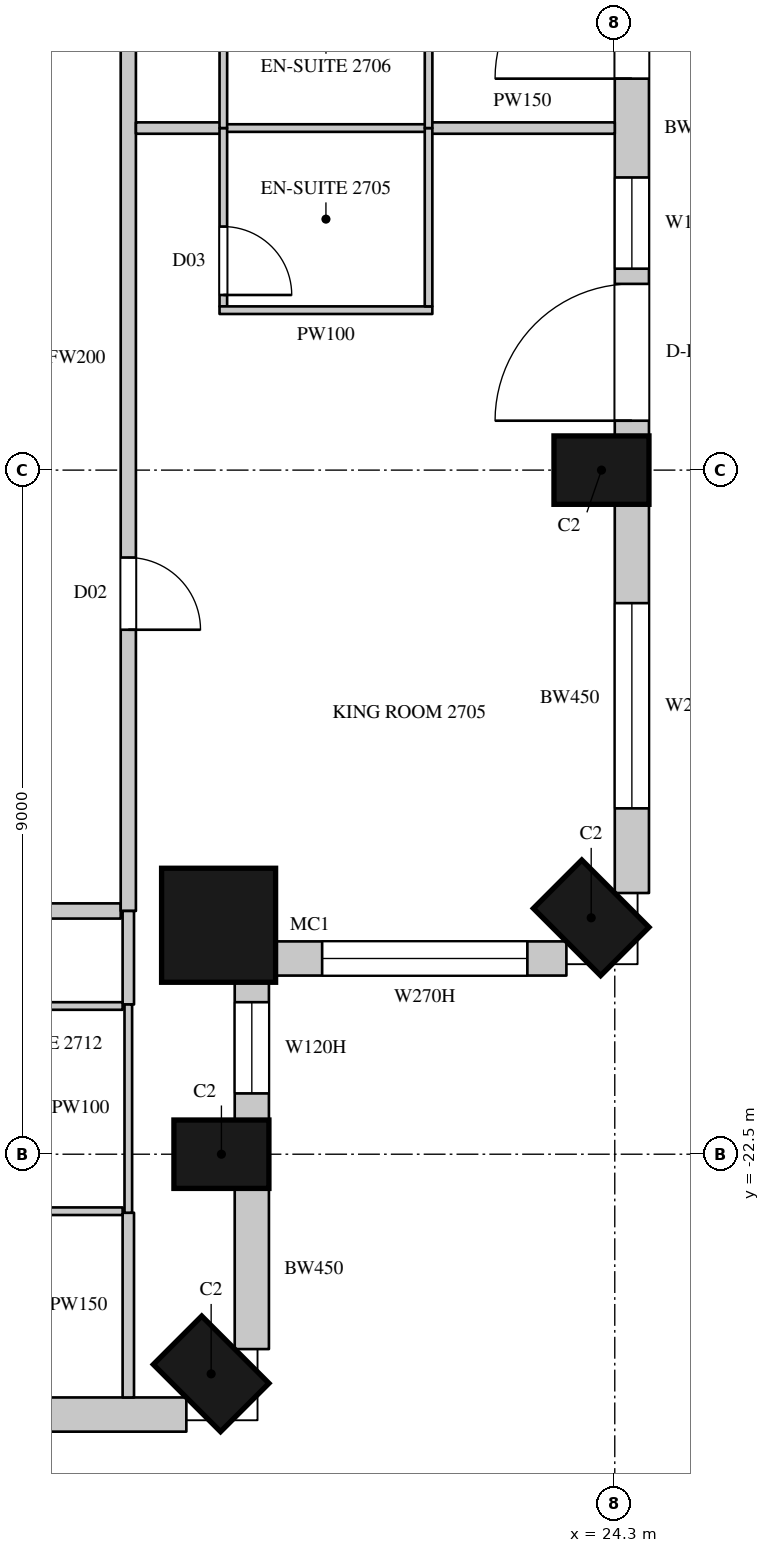
"""IFC4 building model, lengths in metres.
Left out: names, types, materials, properties, quantities, classifications, styles, units other than length and angle.
Written with IfcOpenShell. Run it as: python <this file> out.ifc"""

import sys

from ifc_helpers import new_model, si_unit, direction, frame, frame_2d, origin, origin_2d, place, context, subcontext, project, spatial, rectangle, circle, extrude, element, fill, save


model = new_model("IFC4")
c1 = context("Model", 3, precision=1e-05, world=origin(), true_north=direction((0.0, 1.0)))
c2 = subcontext(c1, "Body", "Model", "MODEL_VIEW")
j1 = project(units=[si_unit("LENGTHUNIT", "METRE"), si_unit("PLANEANGLEUNIT", "RADIAN")], contexts=[c1])
p1 = place(None, origin())
s1 = spatial("IfcSite", under=j1, at=p1, CompositionType="ELEMENT")
p2 = place(p1, origin())
s2 = spatial("IfcBuilding", under=s1, at=p2, CompositionType="ELEMENT")
p3 = place(p2, frame((0.0, 0.0, 127.5)))
s3 = spatial("IfcBuildingStorey", under=s2, at=p3, CompositionType="ELEMENT", Elevation=127.5)
for number, where, z_axis, x_axis in (
    (1, (18.99, -25.39, 0.0), (0.0, 0.0, 1.0), (0.707, 0.707, 0.0)),
    (2, (19.125, -22.5, 0.0), (0.0, 0.0, 1.0), (0.0, 1.0, 0.0)),
):
    element("IfcColumn", number, at=place(p3, frame(where, z_axis=z_axis, x_axis=x_axis)), inside=s3, PredefinedType="COLUMN", context=c2, shape_type="SweptSolid", body=[
        extrude(rectangle(XDim=0.9, YDim=1.25, at=origin_2d()), origin(), (0.0, 0.0, 1.0), 3.6),
    ])
p4 = place(p3, frame((19.088, -19.488, 0.0), z_axis=(0.0, 0.0, 1.0), x_axis=(1.0, 0.0, 0.0)))
e3 = element("IfcColumn", 3, at=p4, inside=s3, PredefinedType="COLUMN", context=c2, shape_type="SweptSolid", body=[
    extrude(circle(Radius=0.75, at=origin_2d()), origin(), (0.0, 0.0, 1.0), 3.6),
])
for number, where, z_axis, x_axis in (
    (4, (23.99, -19.39, 0.0), (0.0, 0.0, 1.0), (0.707, 0.707, 0.0)),
    (5, (24.125, -13.5, 0.0), (0.0, 0.0, 1.0), (0.0, 1.0, 0.0)),
):
    element("IfcColumn", number, at=place(p3, frame(where, z_axis=z_axis, x_axis=x_axis)), inside=s3, PredefinedType="COLUMN", context=c2, shape_type="SweptSolid", body=[
        extrude(rectangle(XDim=0.9, YDim=1.25, at=origin_2d()), origin(), (0.0, 0.0, 1.0), 3.6),
    ])
p5 = place(p3, frame((15.75, -25.925, 0.0), z_axis=(0.0, 0.0, 1.0), x_axis=(1.0, 0.0, 0.0)))
e6 = element("IfcWall", 6, at=p5, inside=s3, PredefinedType="SOLIDWALL", context=c2, shape_type="SweptSolid", body=[
    extrude(rectangle(XDim=2.914, YDim=0.45, at=frame_2d((1.457, 0.0))), origin(), (0.0, 0.0, 1.0), 3.3),
])
p6 = place(p3, frame((19.525, -25.064, 0.0), z_axis=(0.0, 0.0, 1.0), x_axis=(0.0, 1.0, 0.0)))
e7 = element("IfcWall", 7, at=p6, inside=s3, PredefinedType="SOLIDWALL", context=c2, shape_type="SweptSolid", body=[
    extrude(rectangle(XDim=2.114, YDim=0.45, at=frame_2d((1.057, 0.0))), origin(), (0.0, 0.0, 1.0), 3.3),
])
p7 = place(p3, frame((19.525, -22.05, 0.0), z_axis=(0.0, 0.0, 1.0), x_axis=(0.0, 1.0, 0.0)))
e8 = element("IfcWall", 8, at=p7, inside=s3, PredefinedType="SOLIDWALL", context=c2, shape_type="SweptSolid", body=[
    extrude(rectangle(XDim=1.843, YDim=0.45, at=frame_2d((0.921, 0.0))), origin(), (0.0, 0.0, 1.0), 3.3),
])
p8 = place(p7, frame((0.35, 0.0, 1.05)))
e9 = element("IfcOpeningElement", 9, at=p8, cuts=e8, PredefinedType="OPENING", context=c2, shape_type="SweptSolid", body=[
    extrude(rectangle(XDim=1.2, YDim=2.0, at=frame_2d((0.6, 1.0))), frame((0.0, 0.235, 0.0), z_axis=(0.0, -1.0, 0.0), x_axis=(1.0, 0.0, 0.0)), (0.0, 0.0, 1.0), 0.47),
])
p9 = place(p3, frame((19.807, -19.925, 0.0), z_axis=(0.0, 0.0, 1.0), x_axis=(1.0, 0.0, 0.0)))
e10 = element("IfcWall", 10, at=p9, inside=s3, PredefinedType="SOLIDWALL", context=c2, shape_type="SweptSolid", body=[
    extrude(rectangle(XDim=3.857, YDim=0.45, at=frame_2d((1.928, 0.0))), origin(), (0.0, 0.0, 1.0), 3.3),
])
p10 = place(p9, frame((0.643, 0.0, 1.05)))
e11 = element("IfcOpeningElement", 11, at=p10, cuts=e10, PredefinedType="OPENING", context=c2, shape_type="SweptSolid", body=[
    extrude(rectangle(XDim=2.7, YDim=2.0, at=frame_2d((1.35, 1.0))), frame((0.0, 0.235, 0.0), z_axis=(0.0, -1.0, 0.0), x_axis=(1.0, 0.0, 0.0)), (0.0, 0.0, 1.0), 0.47),
])
p11 = place(p3, frame((24.525, -19.064, 0.0), z_axis=(0.0, 0.0, 1.0), x_axis=(0.0, 1.0, 0.0)))
e12 = element("IfcWall", 12, at=p11, inside=s3, PredefinedType="SOLIDWALL", context=c2, shape_type="SweptSolid", body=[
    extrude(rectangle(XDim=5.114, YDim=0.45, at=frame_2d((2.557, 0.0))), origin(), (0.0, 0.0, 1.0), 3.3),
])
p12 = place(p11, frame((1.114, 0.0, 1.05)))
e13 = element("IfcOpeningElement", 13, at=p12, cuts=e12, PredefinedType="OPENING", context=c2, shape_type="SweptSolid", body=[
    extrude(rectangle(XDim=2.7, YDim=2.0, at=frame_2d((1.35, 1.0))), frame((0.0, 0.235, 0.0), z_axis=(0.0, -1.0, 0.0), x_axis=(1.0, 0.0, 0.0)), (0.0, 0.0, 1.0), 0.47),
])
p13 = place(p3, frame((24.525, -13.05, 0.0), z_axis=(0.0, 0.0, 1.0), x_axis=(0.0, 1.0, 0.0)))
e14 = element("IfcWall", 14, at=p13, inside=s3, PredefinedType="SOLIDWALL", context=c2, shape_type="SweptSolid", body=[
    extrude(rectangle(XDim=8.1, YDim=0.45, at=frame_2d((4.05, 0.0))), origin(), (0.0, 0.0, 1.0), 3.3),
])
p14 = place(p13, frame((0.2, 0.0, 0.0)))
e15 = element("IfcOpeningElement", 15, at=p14, cuts=e14, PredefinedType="OPENING", context=c2, shape_type="SweptSolid", body=[
    extrude(rectangle(XDim=1.8, YDim=2.4, at=frame_2d((0.9, 1.2))), frame((0.0, 0.235, 0.0), z_axis=(0.0, -1.0, 0.0), x_axis=(1.0, 0.0, 0.0)), (0.0, 0.0, 1.0), 0.47),
])
p15 = place(p13, frame((2.2, 0.0, 1.05)))
e16 = element("IfcOpeningElement", 16, at=p15, cuts=e14, PredefinedType="OPENING", context=c2, shape_type="SweptSolid", body=[
    extrude(rectangle(XDim=1.2, YDim=2.0, at=frame_2d((0.6, 1.0))), frame((0.0, 0.235, 0.0), z_axis=(0.0, -1.0, 0.0), x_axis=(1.0, 0.0, 0.0)), (0.0, 0.0, 1.0), 0.47),
])
p16 = place(p13, frame((4.7, 0.0, 0.0)))
e17 = element("IfcOpeningElement", 17, at=p16, cuts=e14, PredefinedType="OPENING", context=c2, shape_type="SweptSolid", body=[
    extrude(rectangle(XDim=1.8, YDim=2.4, at=frame_2d((0.9, 1.2))), frame((0.0, 0.235, 0.0), z_axis=(0.0, -1.0, 0.0), x_axis=(1.0, 0.0, 0.0)), (0.0, 0.0, 1.0), 0.47),
])
p17 = place(p13, frame((6.7, 0.0, 1.05)))
e18 = element("IfcOpeningElement", 18, at=p17, cuts=e14, PredefinedType="OPENING", context=c2, shape_type="SweptSolid", body=[
    extrude(rectangle(XDim=1.2, YDim=2.0, at=frame_2d((0.6, 1.0))), frame((0.0, 0.235, 0.0), z_axis=(0.0, -1.0, 0.0), x_axis=(1.0, 0.0, 0.0)), (0.0, 0.0, 1.0), 0.47),
])
p18 = place(p3, frame((-20.8, -19.3, 0.0), z_axis=(0.0, 0.0, 1.0), x_axis=(1.0, 0.0, 0.0)))
e19 = element("IfcWall", 19, at=p18, inside=s3, PredefinedType="PARTITIONING", context=c2, shape_type="SweptSolid", body=[
    extrude(rectangle(XDim=38.6, YDim=0.2, at=frame_2d((19.3, 0.0))), origin(), (0.0, 0.0, 1.0), 3.3),
])
p19 = place(p18, frame((11.2, 0.0, 0.0)))
e20 = element("IfcOpeningElement", 20, at=p19, cuts=e19, PredefinedType="OPENING", context=c2, shape_type="SweptSolid", body=[
    extrude(rectangle(XDim=0.95, YDim=2.2, at=frame_2d((0.475, 1.1))), frame((0.0, 0.11, 0.0), z_axis=(0.0, -1.0, 0.0), x_axis=(1.0, 0.0, 0.0)), (0.0, 0.0, 1.0), 0.22),
])
p20 = place(p18, frame((15.05, 0.0, 0.0)))
e21 = element("IfcOpeningElement", 21, at=p20, cuts=e19, PredefinedType="OPENING", context=c2, shape_type="SweptSolid", body=[
    extrude(rectangle(XDim=0.95, YDim=2.2, at=frame_2d((0.475, 1.1))), frame((0.0, 0.11, 0.0), z_axis=(0.0, -1.0, 0.0), x_axis=(1.0, 0.0, 0.0)), (0.0, 0.0, 1.0), 0.22),
])
p21 = place(p18, frame((29.2, 0.0, 0.0)))
e22 = element("IfcOpeningElement", 22, at=p21, cuts=e19, PredefinedType="OPENING", context=c2, shape_type="SweptSolid", body=[
    extrude(rectangle(XDim=0.95, YDim=2.2, at=frame_2d((0.475, 1.1))), frame((0.0, 0.11, 0.0), z_axis=(0.0, -1.0, 0.0), x_axis=(1.0, 0.0, 0.0)), (0.0, 0.0, 1.0), 0.22),
])
p22 = place(p18, frame((33.05, 0.0, 0.0)))
e23 = element("IfcOpeningElement", 23, at=p22, cuts=e19, PredefinedType="OPENING", context=c2, shape_type="SweptSolid", body=[
    extrude(rectangle(XDim=0.95, YDim=2.2, at=frame_2d((0.475, 1.1))), frame((0.0, 0.11, 0.0), z_axis=(0.0, -1.0, 0.0), x_axis=(1.0, 0.0, 0.0)), (0.0, 0.0, 1.0), 0.22),
])
p23 = place(p3, frame((17.9, -19.3, 0.0), z_axis=(0.0, 0.0, 1.0), x_axis=(0.0, 1.0, 0.0)))
e24 = element("IfcWall", 24, at=p23, inside=s3, PredefinedType="PARTITIONING", context=c2, shape_type="SweptSolid", body=[
    extrude(rectangle(XDim=14.55, YDim=0.2, at=frame_2d((7.275, 0.0))), origin(), (0.0, 0.0, 1.0), 3.3),
])
p24 = place(p23, frame((3.7, 0.0, 0.0)))
e25 = element("IfcOpeningElement", 25, at=p24, cuts=e24, PredefinedType="OPENING", context=c2, shape_type="SweptSolid", body=[
    extrude(rectangle(XDim=0.95, YDim=2.2, at=frame_2d((0.475, 1.1))), frame((0.0, 0.11, 0.0), z_axis=(0.0, -1.0, 0.0), x_axis=(1.0, 0.0, 0.0)), (0.0, 0.0, 1.0), 0.22),
])
p25 = place(p23, frame((13.2, 0.0, 0.0)))
e26 = element("IfcOpeningElement", 26, at=p25, cuts=e24, PredefinedType="OPENING", context=c2, shape_type="SweptSolid", body=[
    extrude(rectangle(XDim=0.95, YDim=2.2, at=frame_2d((0.475, 1.1))), frame((0.0, 0.11, 0.0), z_axis=(0.0, -1.0, 0.0), x_axis=(1.0, 0.0, 0.0)), (0.0, 0.0, 1.0), 0.22),
])
p26 = place(p3, frame((17.9, -25.7, 0.0), z_axis=(0.0, 0.0, 1.0), x_axis=(0.0, 1.0, 0.0)))
e27 = element("IfcWall", 27, at=p26, inside=s3, PredefinedType="PARTITIONING", context=c2, shape_type="SweptSolid", body=[
    extrude(rectangle(XDim=2.43, YDim=0.15, at=frame_2d((1.215, 0.0))), origin(), (0.0, 0.0, 1.0), 3.3),
])
p27 = place(p3, frame((17.9, -20.53, 0.0), z_axis=(0.0, 0.0, 1.0), x_axis=(0.0, 1.0, 0.0)))
e28 = element("IfcWall", 28, at=p27, inside=s3, PredefinedType="PARTITIONING", context=c2, shape_type="SweptSolid", body=[
    extrude(rectangle(XDim=1.23, YDim=0.15, at=frame_2d((0.615, 0.0))), origin(), (0.0, 0.0, 1.0), 3.3),
])
p28 = place(p3, frame((18.0, -9.0, 0.0), z_axis=(0.0, 0.0, 1.0), x_axis=(1.0, 0.0, 0.0)))
e29 = element("IfcWall", 29, at=p28, inside=s3, PredefinedType="PARTITIONING", context=c2, shape_type="SweptSolid", body=[
    extrude(rectangle(XDim=1.13, YDim=0.15, at=frame_2d((0.565, 0.0))), origin(), (0.0, 0.0, 1.0), 2.65),
])
p29 = place(p3, frame((21.87, -9.0, 0.0), z_axis=(0.0, 0.0, 1.0), x_axis=(1.0, 0.0, 0.0)))
e30 = element("IfcWall", 30, at=p29, inside=s3, PredefinedType="PARTITIONING", context=c2, shape_type="SweptSolid", body=[
    extrude(rectangle(XDim=2.43, YDim=0.15, at=frame_2d((1.215, 0.0))), origin(), (0.0, 0.0, 1.0), 2.65),
])
for number, where, z_axis, x_axis in (
    (31, (15.45, -23.25, 0.0), (0.0, 0.0, 1.0), (1.0, 0.0, 0.0)),
    (32, (15.45, -20.55, 0.0), (0.0, 0.0, 1.0), (1.0, 0.0, 0.0)),
):
    element("IfcWall", number, at=place(p3, frame(where, z_axis=z_axis, x_axis=x_axis)), inside=s3, PredefinedType="PARTITIONING", context=c2, shape_type="SweptSolid", body=[
        extrude(rectangle(XDim=2.375, YDim=0.1, at=frame_2d((1.188, 0.0))), origin(), (0.0, 0.0, 1.0), 3.3),
    ])
p30 = place(p3, frame((17.9, -23.27, 0.0), z_axis=(0.0, 0.0, 1.0), x_axis=(0.0, 1.0, 0.0)))
e33 = element("IfcWall", 33, at=p30, inside=s3, PredefinedType="PARTITIONING", context=c2, shape_type="SweptSolid", body=[
    extrude(rectangle(XDim=2.74, YDim=0.1, at=frame_2d((1.37, 0.0))), origin(), (0.0, 0.0, 1.0), 3.3),
])
p31 = place(p3, frame((19.13, -9.0, 0.0), z_axis=(0.0, 0.0, 1.0), x_axis=(1.0, 0.0, 0.0)))
e34 = element("IfcWall", 34, at=p31, inside=s3, PredefinedType="PARTITIONING", context=c2, shape_type="SweptSolid", body=[
    extrude(rectangle(XDim=2.74, YDim=0.1, at=frame_2d((1.37, 0.0))), origin(), (0.0, 0.0, 1.0), 2.65),
])
p32 = place(p3, frame((19.15, -11.346, 0.0), z_axis=(0.0, 0.0, 1.0), x_axis=(0.0, 1.0, 0.0)))
e35 = element("IfcWall", 35, at=p32, inside=s3, PredefinedType="PARTITIONING", context=c2, shape_type="SweptSolid", body=[
    extrude(rectangle(XDim=2.346, YDim=0.1, at=frame_2d((1.173, 0.0))), origin(), (0.0, 0.0, 1.0), 3.3),
])
p33 = place(p32, frame((0.15, 0.0, 0.0)))
e36 = element("IfcOpeningElement", 36, at=p33, cuts=e35, PredefinedType="OPENING", context=c2, shape_type="SweptSolid", body=[
    extrude(rectangle(XDim=0.9, YDim=2.2, at=frame_2d((0.45, 1.1))), frame((0.0, 0.06, 0.0), z_axis=(0.0, -1.0, 0.0), x_axis=(1.0, 0.0, 0.0)), (0.0, 0.0, 1.0), 0.12),
])
p34 = place(p3, frame((19.1, -11.396, 0.0), z_axis=(0.0, 0.0, 1.0), x_axis=(1.0, 0.0, 0.0)))
e37 = element("IfcWall", 37, at=p34, inside=s3, PredefinedType="PARTITIONING", context=c2, shape_type="SweptSolid", body=[
    extrude(rectangle(XDim=2.8, YDim=0.1, at=frame_2d((1.4, 0.0))), origin(), (0.0, 0.0, 1.0), 3.3),
])
p35 = place(p3, frame((19.15, -9.0, 0.0), z_axis=(0.0, 0.0, 1.0), x_axis=(0.000499051739, 0.999999875474, 0.0)))
e38 = element("IfcWall", 38, at=p35, inside=s3, PredefinedType="PARTITIONING", context=c2, shape_type="SweptSolid", body=[
    extrude(rectangle(XDim=2.446, YDim=0.1, at=frame_2d((1.223, 0.0))), origin(), (0.0, 0.0, 1.0), 3.3),
])
p36 = place(p35, frame((1.3, 0.0, 0.0)))
e39 = element("IfcOpeningElement", 39, at=p36, cuts=e38, PredefinedType="OPENING", context=c2, shape_type="SweptSolid", body=[
    extrude(rectangle(XDim=0.9, YDim=2.2, at=frame_2d((0.45, 1.1))), frame((0.0, 0.06, 0.0), z_axis=(0.0, -1.0, 0.0), x_axis=(1.0, 0.0, 0.0)), (0.0, 0.0, 1.0), 0.12),
])
p37 = place(p3, frame((21.85, -11.346, 0.0), z_axis=(0.0, 0.0, 1.0), x_axis=(0.0, 1.0, 0.0)))
e40 = element("IfcWall", 40, at=p37, inside=s3, PredefinedType="PARTITIONING", context=c2, shape_type="SweptSolid", body=[
    extrude(rectangle(XDim=2.346, YDim=0.1, at=frame_2d((1.173, 0.0))), origin(), (0.0, 0.0, 1.0), 3.3),
])
p38 = place(p3, frame((21.85, -9.0, 0.0), z_axis=(0.0, 0.0, 1.0), x_axis=(0.00041644973, 0.999999913285, 0.0)))
e41 = element("IfcWall", 41, at=p38, inside=s3, PredefinedType="PARTITIONING", context=c2, shape_type="SweptSolid", body=[
    extrude(rectangle(XDim=2.345, YDim=0.1, at=frame_2d((1.172, 0.0))), origin(), (0.0, 0.0, 1.0), 3.3),
])
p39 = place(p8, origin())
e42 = element("IfcWindow", 42, at=p39, inside=s3, PartitioningType="SINGLE_PANEL", PredefinedType="WINDOW", context=c2, shape_type="SweptSolid", body=[
    extrude(rectangle(XDim=1.2, YDim=2.0, at=frame_2d((0.6, 1.0))), frame((0.0, 0.135, 0.0), z_axis=(0.0, -1.0, 0.0), x_axis=(1.0, 0.0, 0.0)), (0.0, 0.0, 1.0), 0.06),
])
fill(e9, e42)
p40 = place(p10, origin())
e43 = element("IfcWindow", 43, at=p40, inside=s3, PartitioningType="SINGLE_PANEL", PredefinedType="WINDOW", context=c2, shape_type="SweptSolid", body=[
    extrude(rectangle(XDim=2.7, YDim=2.0, at=frame_2d((1.35, 1.0))), frame((0.0, 0.135, 0.0), z_axis=(0.0, -1.0, 0.0), x_axis=(1.0, 0.0, 0.0)), (0.0, 0.0, 1.0), 0.06),
])
fill(e11, e43)
p41 = place(p12, origin())
e44 = element("IfcWindow", 44, at=p41, inside=s3, PartitioningType="SINGLE_PANEL", PredefinedType="WINDOW", context=c2, shape_type="SweptSolid", body=[
    extrude(rectangle(XDim=2.7, YDim=2.0, at=frame_2d((1.35, 1.0))), frame((0.0, 0.135, 0.0), z_axis=(0.0, -1.0, 0.0), x_axis=(1.0, 0.0, 0.0)), (0.0, 0.0, 1.0), 0.06),
])
fill(e13, e44)
p42 = place(p14, origin())
e45 = element("IfcDoor", 45, at=p42, inside=s3, OperationType="SLIDING_TO_LEFT", PredefinedType="DOOR", context=c2, shape_type="SweptSolid", body=[
    extrude(rectangle(XDim=1.8, YDim=2.4, at=frame_2d((0.9, 1.2))), frame((0.0, 0.13, 0.0), z_axis=(0.0, -1.0, 0.0), x_axis=(1.0, 0.0, 0.0)), (0.0, 0.0, 1.0), 0.05),
])
fill(e15, e45)
p43 = place(p15, origin())
e46 = element("IfcWindow", 46, at=p43, inside=s3, PartitioningType="SINGLE_PANEL", PredefinedType="WINDOW", context=c2, shape_type="SweptSolid", body=[
    extrude(rectangle(XDim=1.2, YDim=2.0, at=frame_2d((0.6, 1.0))), frame((0.0, 0.135, 0.0), z_axis=(0.0, -1.0, 0.0), x_axis=(1.0, 0.0, 0.0)), (0.0, 0.0, 1.0), 0.06),
])
fill(e16, e46)
p44 = place(p16, origin())
e47 = element("IfcDoor", 47, at=p44, inside=s3, OperationType="SLIDING_TO_LEFT", PredefinedType="DOOR", context=c2, shape_type="SweptSolid", body=[
    extrude(rectangle(XDim=1.8, YDim=2.4, at=frame_2d((0.9, 1.2))), frame((0.0, 0.13, 0.0), z_axis=(0.0, -1.0, 0.0), x_axis=(1.0, 0.0, 0.0)), (0.0, 0.0, 1.0), 0.05),
])
fill(e17, e47)
p45 = place(p24, origin())
e48 = element("IfcDoor", 48, at=p45, inside=s3, OperationType="SINGLE_SWING_RIGHT", PredefinedType="DOOR", context=c2, shape_type="SweptSolid", body=[
    extrude(rectangle(XDim=0.95, YDim=2.2, at=frame_2d((0.475, 1.1))), frame((0.0, 0.025, 0.0), z_axis=(0.0, -1.0, 0.0), x_axis=(1.0, 0.0, 0.0)), (0.0, 0.0, 1.0), 0.05),
])
fill(e25, e48)
p46 = place(p33, origin())
e49 = element("IfcDoor", 49, at=p46, inside=s3, OperationType="SINGLE_SWING_RIGHT", PredefinedType="DOOR", context=c2, shape_type="SweptSolid", body=[
    extrude(rectangle(XDim=0.9, YDim=2.2, at=frame_2d((0.45, 1.1))), frame((0.0, 0.025, 0.0), z_axis=(0.0, -1.0, 0.0), x_axis=(1.0, 0.0, 0.0)), (0.0, 0.0, 1.0), 0.05),
])
fill(e36, e49)
save(model, sys.argv[1])
